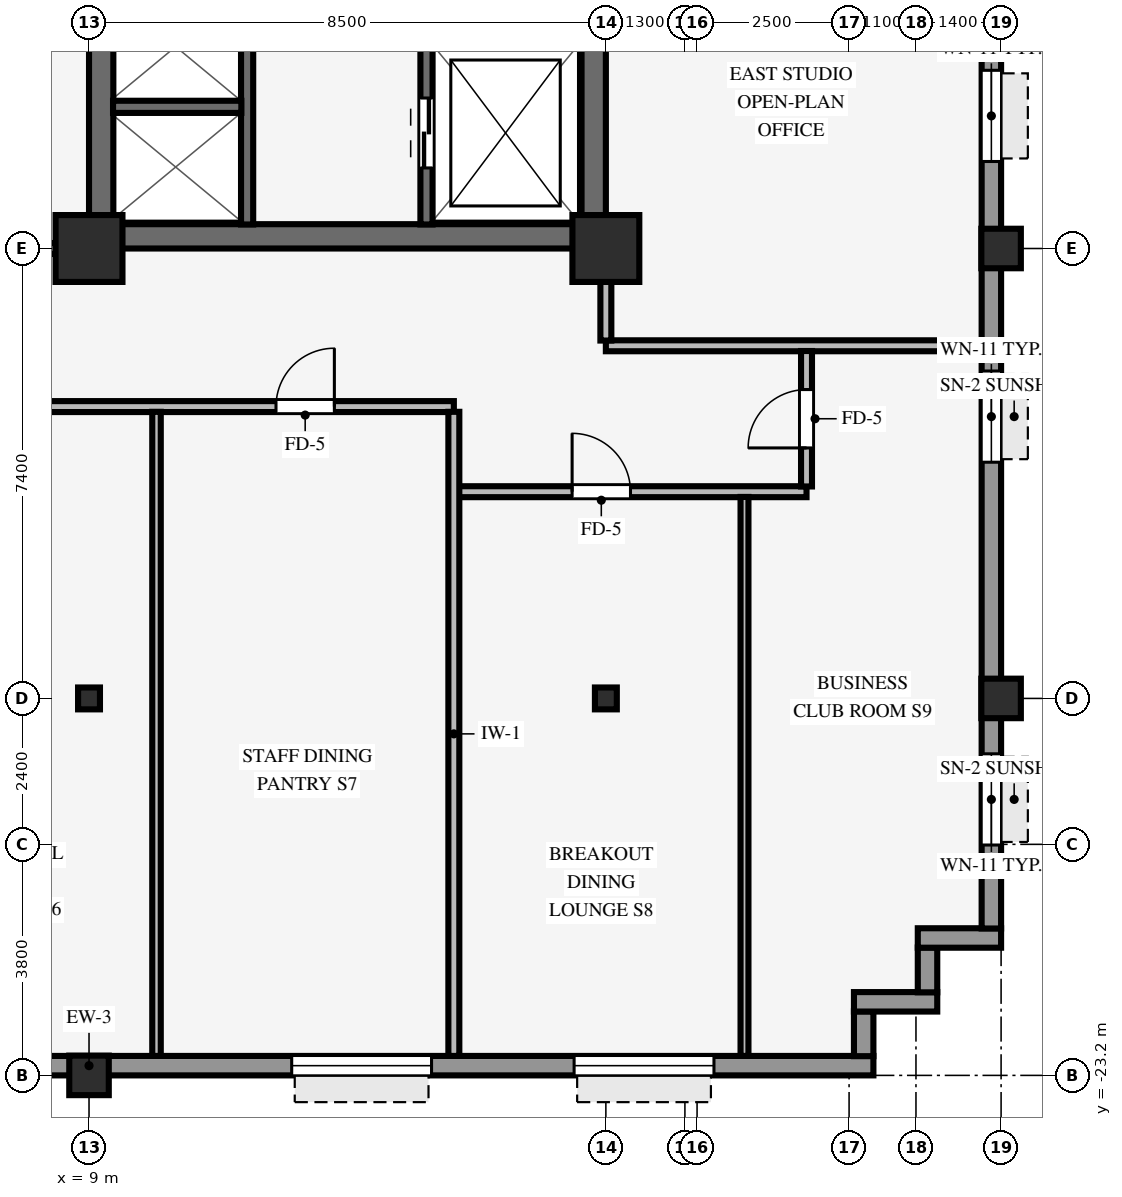
"""IFC4 building model, lengths in metres.
Left out: names, types, materials, properties, quantities, classifications, styles, units other than length and angle.
Written with IfcOpenShell. Run it as: python <this file> out.ifc"""

import sys

from ifc_helpers import new_model, si_unit, direction, frame, frame_2d, origin, origin_2d, place, context, subcontext, project, spatial, rectangle, hollow_rectangle, i_section, extrude, source, transform, mapped, element, fill, save


model = new_model("IFC4")
c1 = context("Model", 3, precision=1e-05, world=origin(), true_north=direction((0.0, 1.0)))
c2 = subcontext(c1, "Body", "Model", "MODEL_VIEW")
j1 = project(units=[si_unit("LENGTHUNIT", "METRE"), si_unit("PLANEANGLEUNIT", "RADIAN")], contexts=[c1])
p1 = place(None, origin())
s1 = spatial("IfcSite", under=j1, at=p1, CompositionType="ELEMENT")
p2 = place(p1, origin())
s2 = spatial("IfcBuilding", under=s1, at=p2, CompositionType="ELEMENT")
p3 = place(p2, frame((0.0, 0.0, 98.3)))
s3 = spatial("IfcBuildingStorey", under=s2, at=p3, CompositionType="ELEMENT", Elevation=98.3)
p4 = place(p3, frame((9.0, -9.4, 0.0), z_axis=(0.0, 0.0, 1.0), x_axis=(1.0, 0.0, 0.0)))
e1 = element("IfcWall", 1, at=p4, inside=s3, PredefinedType="SHEAR", context=c2, shape_type="SweptSolid", body=[
    extrude(rectangle(XDim=8.5, YDim=0.4, at=frame_2d((4.25, 0.0))), origin(), (0.0, 0.0, 1.0), 3.37),
])
p5 = place(p3, frame((9.2, -9.205, 0.0), z_axis=(0.0, 0.0, 1.0), x_axis=(0.0, 1.0, 0.0)))
e2 = element("IfcWall", 2, at=p5, inside=s3, PredefinedType="SHEAR", context=c2, shape_type="SweptSolid", body=[
    extrude(rectangle(XDim=18.41, YDim=0.4, at=frame_2d((9.205, 0.0))), origin(), (0.0, 0.0, 1.0), 3.37),
])
p6 = place(p5, frame((8.605, 0.0, 0.0)))
e3 = element("IfcOpeningElement", 3, at=p6, cuts=e2, PredefinedType="OPENING", context=c2, shape_type="SweptSolid", body=[
    extrude(rectangle(XDim=1.2, YDim=2.15, at=frame_2d((0.6, 1.075))), frame((0.0, 0.21, 0.0), z_axis=(0.0, -1.0, 0.0), x_axis=(1.0, 0.0, 0.0)), (0.0, 0.0, 1.0), 0.42),
])
p7 = place(p3, frame((17.3, -9.205, 0.0), z_axis=(0.0, 0.0, 1.0), x_axis=(0.0, 1.0, 0.0)))
e4 = element("IfcWall", 4, at=p7, inside=s3, PredefinedType="SHEAR", context=c2, shape_type="SweptSolid", body=[
    extrude(rectangle(XDim=18.41, YDim=0.4, at=frame_2d((9.205, 0.0))), origin(), (0.0, 0.0, 1.0), 3.37),
])
for number, where, z_axis, x_axis in (
    (5, (9.0, -9.6, 0.0), (0.0, 0.0, 1.0), (1.0, 0.0, 0.0)),
    (6, (17.5, -9.6, 0.0), (0.0, 0.0, 1.0), (1.0, 0.0, 0.0)),
):
    element("IfcColumn", number, at=place(p3, frame(where, z_axis=z_axis, x_axis=x_axis)), inside=s3, PredefinedType="COLUMN", context=c2, shape_type="SweptSolid", body=[
        extrude(rectangle(XDim=1.1, YDim=1.1, at=origin_2d()), origin(), (0.0, 0.0, 1.0), 3.37),
    ])
for number, where, z_axis, x_axis in (
    (7, (24.0, -17.0, 0.0), (0.0, 0.0, 1.0), (1.0, 0.0, 0.0)),
    (8, (24.0, -9.6, 0.0), (0.0, 0.0, 1.0), (1.0, 0.0, 0.0)),
    (9, (9.0, -23.2, 0.0), (0.0, 0.0, 1.0), (1.0, 0.0, 0.0)),
):
    element("IfcColumn", number, at=place(p3, frame(where, z_axis=z_axis, x_axis=x_axis)), inside=s3, PredefinedType="COLUMN", context=c2, shape_type="SweptSolid", body=[
        extrude(hollow_rectangle(XDim=0.65, YDim=0.65, WallThickness=0.04, InnerFilletRadius=0.04, OuterFilletRadius=0.08, at=origin_2d()), origin(), (0.0, 0.0, 1.0), 3.37),
    ])
for number, where, z_axis, x_axis in (
    (10, (9.0, -17.0, 0.0), (0.0, 0.0, 1.0), (1.0, 0.0, 0.0)),
    (11, (17.5, -17.0, 0.0), (0.0, 0.0, 1.0), (1.0, 0.0, 0.0)),
):
    element("IfcColumn", number, at=place(p3, frame(where, z_axis=z_axis, x_axis=x_axis)), inside=s3, PredefinedType="COLUMN", context=c2, shape_type="SweptSolid", body=[
        extrude(i_section(OverallWidth=0.36, OverallDepth=0.36, WebThickness=0.021, FlangeThickness=0.021, FilletRadius=0.018, at=origin_2d()), origin(), (0.0, 0.0, 1.0), 3.37),
    ])
p8 = place(p3, frame((-21.9, -23.04, 0.0), z_axis=(0.0, 0.0, 1.0), x_axis=(1.0, 0.0, 0.0)))
e12 = element("IfcWall", 12, at=p8, inside=s3, PredefinedType="STANDARD", context=c2, shape_type="SweptSolid", body=[
    extrude(rectangle(XDim=43.8, YDim=0.32, at=frame_2d((21.9, 0.0))), origin(), (0.0, 0.0, 1.0), 2.705),
])
p9 = place(p8, frame((17.58, 0.0, 0.0), z_axis=(0.0, 0.0, 1.0), x_axis=(-1.0, 0.0, 0.0)))
e13 = element("IfcOpeningElement", 13, at=p9, cuts=e12, PredefinedType="OPENING", context=c2, shape_type="SweptSolid", body=[
    extrude(rectangle(XDim=0.98, YDim=2.15, at=frame_2d((0.49, 1.075))), frame((0.0, 0.17, 0.0), z_axis=(0.0, -1.0, 0.0), x_axis=(1.0, 0.0, 0.0)), (0.0, 0.0, 1.0), 0.34),
])
p10 = place(p8, frame((2.622, 0.0, 0.8)))
e14 = element("IfcOpeningElement", 14, at=p10, cuts=e12, PredefinedType="OPENING", context=c2, shape_type="SweptSolid", body=[
    extrude(rectangle(XDim=2.3, YDim=1.62, at=frame_2d((1.15, 0.81))), frame((0.0, 0.17, 0.0), z_axis=(0.0, -1.0, 0.0), x_axis=(1.0, 0.0, 0.0)), (0.0, 0.0, 1.0), 0.34),
])
p11 = place(p8, frame((8.167, 0.0, 0.8)))
e15 = element("IfcOpeningElement", 15, at=p11, cuts=e12, PredefinedType="OPENING", context=c2, shape_type="SweptSolid", body=[
    extrude(rectangle(XDim=2.3, YDim=1.62, at=frame_2d((1.15, 0.81))), frame((0.0, 0.17, 0.0), z_axis=(0.0, -1.0, 0.0), x_axis=(1.0, 0.0, 0.0)), (0.0, 0.0, 1.0), 0.34),
])
p12 = place(p8, frame((24.044, 0.0, 0.8)))
e16 = element("IfcOpeningElement", 16, at=p12, cuts=e12, PredefinedType="OPENING", context=c2, shape_type="SweptSolid", body=[
    extrude(rectangle(XDim=2.3, YDim=1.62, at=frame_2d((1.15, 0.81))), frame((0.0, 0.17, 0.0), z_axis=(0.0, -1.0, 0.0), x_axis=(1.0, 0.0, 0.0)), (0.0, 0.0, 1.0), 0.34),
])
p13 = place(p8, frame((34.233, 0.0, 0.8)))
e17 = element("IfcOpeningElement", 17, at=p13, cuts=e12, PredefinedType="OPENING", context=c2, shape_type="SweptSolid", body=[
    extrude(rectangle(XDim=2.3, YDim=1.62, at=frame_2d((1.15, 0.81))), frame((0.0, 0.17, 0.0), z_axis=(0.0, -1.0, 0.0), x_axis=(1.0, 0.0, 0.0)), (0.0, 0.0, 1.0), 0.34),
])
p14 = place(p8, frame((38.878, 0.0, 0.8)))
e18 = element("IfcOpeningElement", 18, at=p14, cuts=e12, PredefinedType="OPENING", context=c2, shape_type="SweptSolid", body=[
    extrude(rectangle(XDim=2.3, YDim=1.62, at=frame_2d((1.15, 0.81))), frame((0.0, 0.17, 0.0), z_axis=(0.0, -1.0, 0.0), x_axis=(1.0, 0.0, 0.0)), (0.0, 0.0, 1.0), 0.34),
])
p15 = place(p3, frame((21.74, -22.884, 0.0), z_axis=(0.0, 0.0, 1.0), x_axis=(0.0, 1.0, 0.0)))
e19 = element("IfcWall", 19, at=p15, inside=s3, PredefinedType="STANDARD", context=c2, shape_type="SweptSolid", body=[
    extrude(rectangle(XDim=0.738, YDim=0.32, at=frame_2d((0.369, 0.0))), origin(), (0.0, 0.0, 1.0), 3.36),
])
p16 = place(p3, frame((21.58, -21.99, 0.0), z_axis=(0.0, 0.0, 1.0), x_axis=(1.0, 0.0, 0.0)))
e20 = element("IfcWall", 20, at=p16, inside=s3, PredefinedType="STANDARD", context=c2, shape_type="SweptSolid", body=[
    extrude(rectangle(XDim=1.37, YDim=0.32, at=frame_2d((0.685, 0.0))), origin(), (0.0, 0.0, 1.0), 3.36),
])
p17 = place(p3, frame((22.79, -21.834, 0.0), z_axis=(0.0, 0.0, 1.0), x_axis=(0.0, 1.0, 0.0)))
e21 = element("IfcWall", 21, at=p17, inside=s3, PredefinedType="STANDARD", context=c2, shape_type="SweptSolid", body=[
    extrude(rectangle(XDim=0.738, YDim=0.32, at=frame_2d((0.369, 0.0))), origin(), (0.0, 0.0, 1.0), 3.36),
])
p18 = place(p3, frame((22.63, -20.94, 0.0), z_axis=(0.0, 0.0, 1.0), x_axis=(1.0, 0.0, 0.0)))
e22 = element("IfcWall", 22, at=p18, inside=s3, PredefinedType="STANDARD", context=c2, shape_type="SweptSolid", body=[
    extrude(rectangle(XDim=1.37, YDim=0.32, at=frame_2d((0.685, 0.0))), origin(), (0.0, 0.0, 1.0), 3.36),
])
p19 = place(p3, frame((23.84, -20.784, 0.0), z_axis=(0.0, 0.0, 1.0), x_axis=(0.0, 1.0, 0.0)))
e23 = element("IfcWall", 23, at=p19, inside=s3, PredefinedType="STANDARD", context=c2, shape_type="SweptSolid", body=[
    extrude(rectangle(XDim=41.568, YDim=0.32, at=frame_2d((20.784, 0.0))), origin(), (0.0, 0.0, 1.0), 2.705),
])
p20 = place(p19, frame((1.373, 0.0, 0.8)))
e24 = element("IfcOpeningElement", 24, at=p20, cuts=e23, PredefinedType="OPENING", context=c2, shape_type="SweptSolid", body=[
    extrude(rectangle(XDim=1.5, YDim=1.6, at=frame_2d((0.75, 0.8))), frame((0.0, 0.17, 0.0), z_axis=(0.0, -1.0, 0.0), x_axis=(1.0, 0.0, 0.0)), (0.0, 0.0, 1.0), 0.34),
])
p21 = place(p19, frame((7.669, 0.0, 0.8)))
e25 = element("IfcOpeningElement", 25, at=p21, cuts=e23, PredefinedType="OPENING", context=c2, shape_type="SweptSolid", body=[
    extrude(rectangle(XDim=1.5, YDim=1.6, at=frame_2d((0.75, 0.8))), frame((0.0, 0.17, 0.0), z_axis=(0.0, -1.0, 0.0), x_axis=(1.0, 0.0, 0.0)), (0.0, 0.0, 1.0), 0.34),
])
p22 = place(p19, frame((12.615, 0.0, 0.8)))
e26 = element("IfcOpeningElement", 26, at=p22, cuts=e23, PredefinedType="OPENING", context=c2, shape_type="SweptSolid", body=[
    extrude(rectangle(XDim=1.5, YDim=1.6, at=frame_2d((0.75, 0.8))), frame((0.0, 0.17, 0.0), z_axis=(0.0, -1.0, 0.0), x_axis=(1.0, 0.0, 0.0)), (0.0, 0.0, 1.0), 0.34),
])
p23 = place(p19, frame((17.561, 0.0, 0.8)))
e27 = element("IfcOpeningElement", 27, at=p23, cuts=e23, PredefinedType="OPENING", context=c2, shape_type="SweptSolid", body=[
    extrude(rectangle(XDim=1.5, YDim=1.6, at=frame_2d((0.75, 0.8))), frame((0.0, 0.17, 0.0), z_axis=(0.0, -1.0, 0.0), x_axis=(1.0, 0.0, 0.0)), (0.0, 0.0, 1.0), 0.34),
])
p24 = place(p19, frame((22.507, 0.0, 0.8)))
e28 = element("IfcOpeningElement", 28, at=p24, cuts=e23, PredefinedType="OPENING", context=c2, shape_type="SweptSolid", body=[
    extrude(rectangle(XDim=1.5, YDim=1.6, at=frame_2d((0.75, 0.8))), frame((0.0, 0.17, 0.0), z_axis=(0.0, -1.0, 0.0), x_axis=(1.0, 0.0, 0.0)), (0.0, 0.0, 1.0), 0.34),
])
p25 = place(p19, frame((27.453, 0.0, 0.8)))
e29 = element("IfcOpeningElement", 29, at=p25, cuts=e23, PredefinedType="OPENING", context=c2, shape_type="SweptSolid", body=[
    extrude(rectangle(XDim=1.5, YDim=1.6, at=frame_2d((0.75, 0.8))), frame((0.0, 0.17, 0.0), z_axis=(0.0, -1.0, 0.0), x_axis=(1.0, 0.0, 0.0)), (0.0, 0.0, 1.0), 0.34),
])
p26 = place(p19, frame((32.399, 0.0, 0.8)))
e30 = element("IfcOpeningElement", 30, at=p26, cuts=e23, PredefinedType="OPENING", context=c2, shape_type="SweptSolid", body=[
    extrude(rectangle(XDim=1.5, YDim=1.6, at=frame_2d((0.75, 0.8))), frame((0.0, 0.17, 0.0), z_axis=(0.0, -1.0, 0.0), x_axis=(1.0, 0.0, 0.0)), (0.0, 0.0, 1.0), 0.34),
])
p27 = place(p19, frame((38.695, 0.0, 0.8)))
e31 = element("IfcOpeningElement", 31, at=p27, cuts=e23, PredefinedType="OPENING", context=c2, shape_type="SweptSolid", body=[
    extrude(rectangle(XDim=1.5, YDim=1.6, at=frame_2d((0.75, 0.8))), frame((0.0, 0.17, 0.0), z_axis=(0.0, -1.0, 0.0), x_axis=(1.0, 0.0, 0.0)), (0.0, 0.0, 1.0), 0.34),
])
p28 = place(p3, frame((14.55, -9.205, 0.0), z_axis=(0.0, 0.0, 1.0), x_axis=(0.0, 1.0, 0.0)))
e32 = element("IfcWall", 32, at=p28, inside=s3, PredefinedType="SHEAR", context=c2, shape_type="SweptSolid", body=[
    extrude(rectangle(XDim=10.11, YDim=0.2, at=frame_2d((5.055, 0.0))), origin(), (0.0, 0.0, 1.0), 3.37),
])
p29 = place(p28, frame((6.565, 0.0, 0.0)))
e33 = element("IfcOpeningElement", 33, at=p29, cuts=e32, PredefinedType="OPENING", context=c2, shape_type="SweptSolid", body=[
    extrude(rectangle(XDim=0.88, YDim=2.1, at=frame_2d((0.44, 1.05))), frame((0.0, 0.11, 0.0), z_axis=(0.0, -1.0, 0.0), x_axis=(1.0, 0.0, 0.0)), (0.0, 0.0, 1.0), 0.22),
])
p30 = place(p28, frame((0.93, 0.0, 0.0)))
e34 = element("IfcOpeningElement", 34, at=p30, cuts=e32, PredefinedType="OPENING", context=c2, shape_type="SweptSolid", body=[
    extrude(rectangle(XDim=1.15, YDim=2.15, at=frame_2d((0.575, 1.075))), frame((0.0, 0.11, 0.0), z_axis=(0.0, -1.0, 0.0), x_axis=(1.0, 0.0, 0.0)), (0.0, 0.0, 1.0), 0.22),
])
p31 = place(p3, frame((11.6, -9.205, 0.0), z_axis=(0.0, 0.0, 1.0), x_axis=(0.0, 1.0, 0.0)))
e35 = element("IfcWall", 35, at=p31, inside=s3, PredefinedType="SHEAR", context=c2, shape_type="SweptSolid", body=[
    extrude(rectangle(XDim=7.975, YDim=0.2, at=frame_2d((3.988, 0.0))), origin(), (0.0, 0.0, 1.0), 3.37),
])
p32 = place(p3, frame((9.395, -7.27, 0.0), z_axis=(0.0, 0.0, 1.0), x_axis=(1.0, 0.0, 0.0)))
e36 = element("IfcWall", 36, at=p32, inside=s3, PredefinedType="SHEAR", context=c2, shape_type="SweptSolid", body=[
    extrude(rectangle(XDim=2.11, YDim=0.2, at=frame_2d((1.055, 0.0))), origin(), (0.0, 0.0, 1.0), 3.37),
])
p33 = place(p3, frame((15.07, -13.6, 0.0), z_axis=(0.0, 0.0, 1.0), x_axis=(1.0, 0.0, 0.0)))
e37 = element("IfcWall", 37, at=p33, inside=s3, PredefinedType="PARTITIONING", context=c2, shape_type="SweptSolid", body=[
    extrude(rectangle(XDim=5.73, YDim=0.18, at=frame_2d((2.865, 0.0))), origin(), (0.0, 0.0, 1.0), 2.998),
])
p34 = place(p33, frame((1.875, 0.0, 0.0)))
e38 = element("IfcOpeningElement", 38, at=p34, cuts=e37, PredefinedType="OPENING", context=c2, shape_type="SweptSolid", body=[
    extrude(rectangle(XDim=0.96, YDim=2.1, at=frame_2d((0.48, 1.05))), frame((0.0, 0.1, 0.0), z_axis=(0.0, -1.0, 0.0), x_axis=(1.0, 0.0, 0.0)), (0.0, 0.0, 1.0), 0.2),
])
p35 = place(p3, frame((-15.0, -12.2, 0.0), z_axis=(0.0, 0.0, 1.0), x_axis=(1.0, 0.0, 0.0)))
e39 = element("IfcWall", 39, at=p35, inside=s3, PredefinedType="PARTITIONING", context=c2, shape_type="SweptSolid", body=[
    extrude(rectangle(XDim=30.0, YDim=0.18, at=frame_2d((15.0, 0.0))), origin(), (0.0, 0.0, 1.0), 3.36),
])
p36 = place(p35, frame((3.98, 0.0, 0.0)))
e40 = element("IfcOpeningElement", 40, at=p36, cuts=e39, PredefinedType="OPENING", context=c2, shape_type="SweptSolid", body=[
    extrude(rectangle(XDim=0.96, YDim=2.1, at=frame_2d((0.48, 1.05))), frame((0.0, 0.1, 0.0), z_axis=(0.0, -1.0, 0.0), x_axis=(1.0, 0.0, 0.0)), (0.0, 0.0, 1.0), 0.2),
])
p37 = place(p35, frame((16.695, 0.0, 0.0)))
e41 = element("IfcOpeningElement", 41, at=p37, cuts=e39, PredefinedType="OPENING", context=c2, shape_type="SweptSolid", body=[
    extrude(rectangle(XDim=0.96, YDim=2.1, at=frame_2d((0.48, 1.05))), frame((0.0, 0.1, 0.0), z_axis=(0.0, -1.0, 0.0), x_axis=(1.0, 0.0, 0.0)), (0.0, 0.0, 1.0), 0.2),
])
p38 = place(p35, frame((22.15, 0.0, 0.0)))
e42 = element("IfcOpeningElement", 42, at=p38, cuts=e39, PredefinedType="OPENING", context=c2, shape_type="SweptSolid", body=[
    extrude(rectangle(XDim=0.96, YDim=2.1, at=frame_2d((0.48, 1.05))), frame((0.0, 0.1, 0.0), z_axis=(0.0, -1.0, 0.0), x_axis=(1.0, 0.0, 0.0)), (0.0, 0.0, 1.0), 0.2),
])
p39 = place(p35, frame((27.075, 0.0, 0.0)))
e43 = element("IfcOpeningElement", 43, at=p39, cuts=e39, PredefinedType="OPENING", context=c2, shape_type="SweptSolid", body=[
    extrude(rectangle(XDim=0.96, YDim=2.1, at=frame_2d((0.48, 1.05))), frame((0.0, 0.1, 0.0), z_axis=(0.0, -1.0, 0.0), x_axis=(1.0, 0.0, 0.0)), (0.0, 0.0, 1.0), 0.2),
])
p40 = place(p35, frame((9.39, 0.0, 0.0)))
e44 = element("IfcOpeningElement", 44, at=p40, cuts=e39, PredefinedType="OPENING", context=c2, shape_type="SweptSolid", body=[
    extrude(rectangle(XDim=0.96, YDim=2.1, at=frame_2d((0.48, 1.05))), frame((0.0, 0.1, 0.0), z_axis=(0.0, -1.0, 0.0), x_axis=(1.0, 0.0, 0.0)), (0.0, 0.0, 1.0), 0.2),
])
p41 = place(p3, frame((17.5, -11.2, 0.0), z_axis=(0.0, 0.0, 1.0), x_axis=(1.0, 0.0, 0.0)))
e45 = element("IfcWall", 45, at=p41, inside=s3, PredefinedType="PARTITIONING", context=c2, shape_type="SweptSolid", body=[
    extrude(rectangle(XDim=6.18, YDim=0.18, at=frame_2d((3.09, 0.0))), origin(), (0.0, 0.0, 1.0), 3.36),
])
p42 = place(p3, frame((0.176, -9.6, 0.0), z_axis=(0.0, 0.0, 1.0), x_axis=(1.0, 0.0, 0.0)))
e46 = element("IfcWall", 46, at=p42, inside=s3, PredefinedType="PARTITIONING", context=c2, shape_type="SweptSolid", body=[
    extrude(rectangle(XDim=8.278, YDim=0.18, at=frame_2d((4.139, 0.0))), origin(), (0.0, 0.0, 1.0), 2.405),
])
p43 = place(p3, frame((10.11, -22.88, 0.0), z_axis=(0.0, 0.0, 1.0), x_axis=(0.0, 1.0, 0.0)))
e47 = element("IfcWall", 47, at=p43, inside=s3, PredefinedType="PARTITIONING", context=c2, shape_type="SweptSolid", body=[
    extrude(rectangle(XDim=10.594, YDim=0.14, at=frame_2d((5.297, 0.0))), origin(), (0.0, 0.0, 1.0), 3.36),
])
p44 = place(p3, frame((15.0, -22.88, 0.0), z_axis=(0.0, 0.0, 1.0), x_axis=(0.0, 1.0, 0.0)))
e48 = element("IfcWall", 48, at=p44, inside=s3, PredefinedType="PARTITIONING", context=c2, shape_type="SweptSolid", body=[
    extrude(rectangle(XDim=10.594, YDim=0.18, at=frame_2d((5.297, 0.0))), origin(), (0.0, 0.0, 1.0), 3.36),
])
p45 = place(p3, frame((17.5, -11.114, 0.0), z_axis=(0.0, 0.0, 1.0), x_axis=(0.0, 1.0, 0.0)))
e49 = element("IfcWall", 49, at=p45, inside=s3, PredefinedType="PARTITIONING", context=c2, shape_type="SweptSolid", body=[
    extrude(rectangle(XDim=0.968, YDim=0.18, at=frame_2d((0.484, 0.0))), origin(), (0.0, 0.0, 1.0), 2.738),
])
p46 = place(p3, frame((19.78, -22.88, 0.0), z_axis=(0.0, 0.0, 1.0), x_axis=(0.0, 1.0, 0.0)))
e50 = element("IfcWall", 50, at=p46, inside=s3, PredefinedType="PARTITIONING", context=c2, shape_type="SweptSolid", body=[
    extrude(rectangle(XDim=9.194, YDim=0.13, at=frame_2d((4.597, 0.0))), origin(), (0.0, 0.0, 1.0), 3.36),
])
p47 = place(p3, frame((20.8, -13.514, 0.0), z_axis=(0.0, 0.0, 1.0), x_axis=(0.0, 1.0, 0.0)))
e51 = element("IfcWall", 51, at=p47, inside=s3, PredefinedType="PARTITIONING", context=c2, shape_type="SweptSolid", body=[
    extrude(rectangle(XDim=2.228, YDim=0.18, at=frame_2d((1.114, 0.0))), origin(), (0.0, 0.0, 1.0), 3.36),
])
p48 = place(p47, frame((0.634, 0.0, 0.0)))
e52 = element("IfcOpeningElement", 52, at=p48, cuts=e51, PredefinedType="OPENING", context=c2, shape_type="SweptSolid", body=[
    extrude(rectangle(XDim=0.96, YDim=2.1, at=frame_2d((0.48, 1.05))), frame((0.0, 0.1, 0.0), z_axis=(0.0, -1.0, 0.0), x_axis=(1.0, 0.0, 0.0)), (0.0, 0.0, 1.0), 0.2),
])
m1 = source(origin(), c2, "Body", "SweptSolid", [
    extrude(rectangle(XDim=2.3, YDim=1.62, at=frame_2d((1.15, 0.81))), frame((0.0, 0.03, 0.0), z_axis=(0.0, -1.0, 0.0), x_axis=(1.0, 0.0, 0.0)), (0.0, 0.0, 1.0), 0.06),
])
p49 = place(p13, origin())
e53 = element("IfcWindow", 53, at=p49, inside=s3, PartitioningType="SINGLE_PANEL", PredefinedType="WINDOW", context=c2, shape_type="MappedRepresentation", body=[
    mapped(m1, transform((0.0, 0.0, 0.0), scale=1.0)),
])
fill(e17, e53)
p50 = place(p14, origin())
e54 = element("IfcWindow", 54, at=p50, inside=s3, PartitioningType="SINGLE_PANEL", PredefinedType="WINDOW", context=c2, shape_type="MappedRepresentation", body=[
    mapped(m1, transform((0.0, 0.0, 0.0), scale=1.0)),
])
fill(e18, e54)
m2 = source(origin(), c2, "Body", "SweptSolid", [
    extrude(rectangle(XDim=1.5, YDim=1.6, at=frame_2d((0.75, 0.8))), frame((0.0, 0.03, 0.0), z_axis=(0.0, -1.0, 0.0), x_axis=(1.0, 0.0, 0.0)), (0.0, 0.0, 1.0), 0.06),
])
p51 = place(p20, origin())
e55 = element("IfcWindow", 55, at=p51, inside=s3, PartitioningType="SINGLE_PANEL", PredefinedType="WINDOW", context=c2, shape_type="MappedRepresentation", body=[
    mapped(m2, transform((0.0, 0.0, 0.0), scale=1.0)),
])
fill(e24, e55)
p52 = place(p21, origin())
e56 = element("IfcWindow", 56, at=p52, inside=s3, PartitioningType="SINGLE_PANEL", PredefinedType="WINDOW", context=c2, shape_type="MappedRepresentation", body=[
    mapped(m2, transform((0.0, 0.0, 0.0), scale=1.0)),
])
fill(e25, e56)
p53 = place(p22, origin())
e57 = element("IfcWindow", 57, at=p53, inside=s3, PartitioningType="SINGLE_PANEL", PredefinedType="WINDOW", context=c2, shape_type="MappedRepresentation", body=[
    mapped(m2, transform((0.0, 0.0, 0.0), scale=1.0)),
])
fill(e26, e57)
m3 = source(origin(), c2, "Body", "SweptSolid", [
    extrude(rectangle(XDim=1.15, YDim=2.15, at=frame_2d((0.575, 1.075))), frame((0.0, 0.025, 0.0), z_axis=(0.0, -1.0, 0.0), x_axis=(1.0, 0.0, 0.0)), (0.0, 0.0, 1.0), 0.05),
])
p54 = place(p30, origin())
e58 = element("IfcDoor", 58, at=p54, inside=s3, OperationType="DOUBLE_DOOR_SLIDING", PredefinedType="DOOR", context=c2, shape_type="MappedRepresentation", body=[
    mapped(m3, transform((0.0, 0.0, 0.0), scale=1.0)),
])
fill(e34, e58)
m4 = source(origin(), c2, "Body", "SweptSolid", [
    extrude(rectangle(XDim=0.96, YDim=2.1, at=frame_2d((0.48, 1.05))), frame((0.0, 0.025, 0.0), z_axis=(0.0, -1.0, 0.0), x_axis=(1.0, 0.0, 0.0)), (0.0, 0.0, 1.0), 0.05),
])
p55 = place(p39, origin())
e59 = element("IfcDoor", 59, at=p55, inside=s3, OperationType="SINGLE_SWING_RIGHT", PredefinedType="DOOR", context=c2, shape_type="MappedRepresentation", body=[
    mapped(m4, transform((0.0, 0.0, 0.0), scale=1.0)),
])
fill(e43, e59)
p56 = place(p34, origin())
e60 = element("IfcDoor", 60, at=p56, inside=s3, OperationType="SINGLE_SWING_LEFT", PredefinedType="DOOR", context=c2, shape_type="MappedRepresentation", body=[
    mapped(m4, transform((0.0, 0.0, 0.0), scale=1.0)),
])
fill(e38, e60)
p57 = place(p48, origin())
e61 = element("IfcDoor", 61, at=p57, inside=s3, OperationType="SINGLE_SWING_LEFT", PredefinedType="DOOR", context=c2, shape_type="MappedRepresentation", body=[
    mapped(m4, transform((0.0, 0.0, 0.0), scale=1.0)),
])
fill(e52, e61)
save(model, sys.argv[1])
